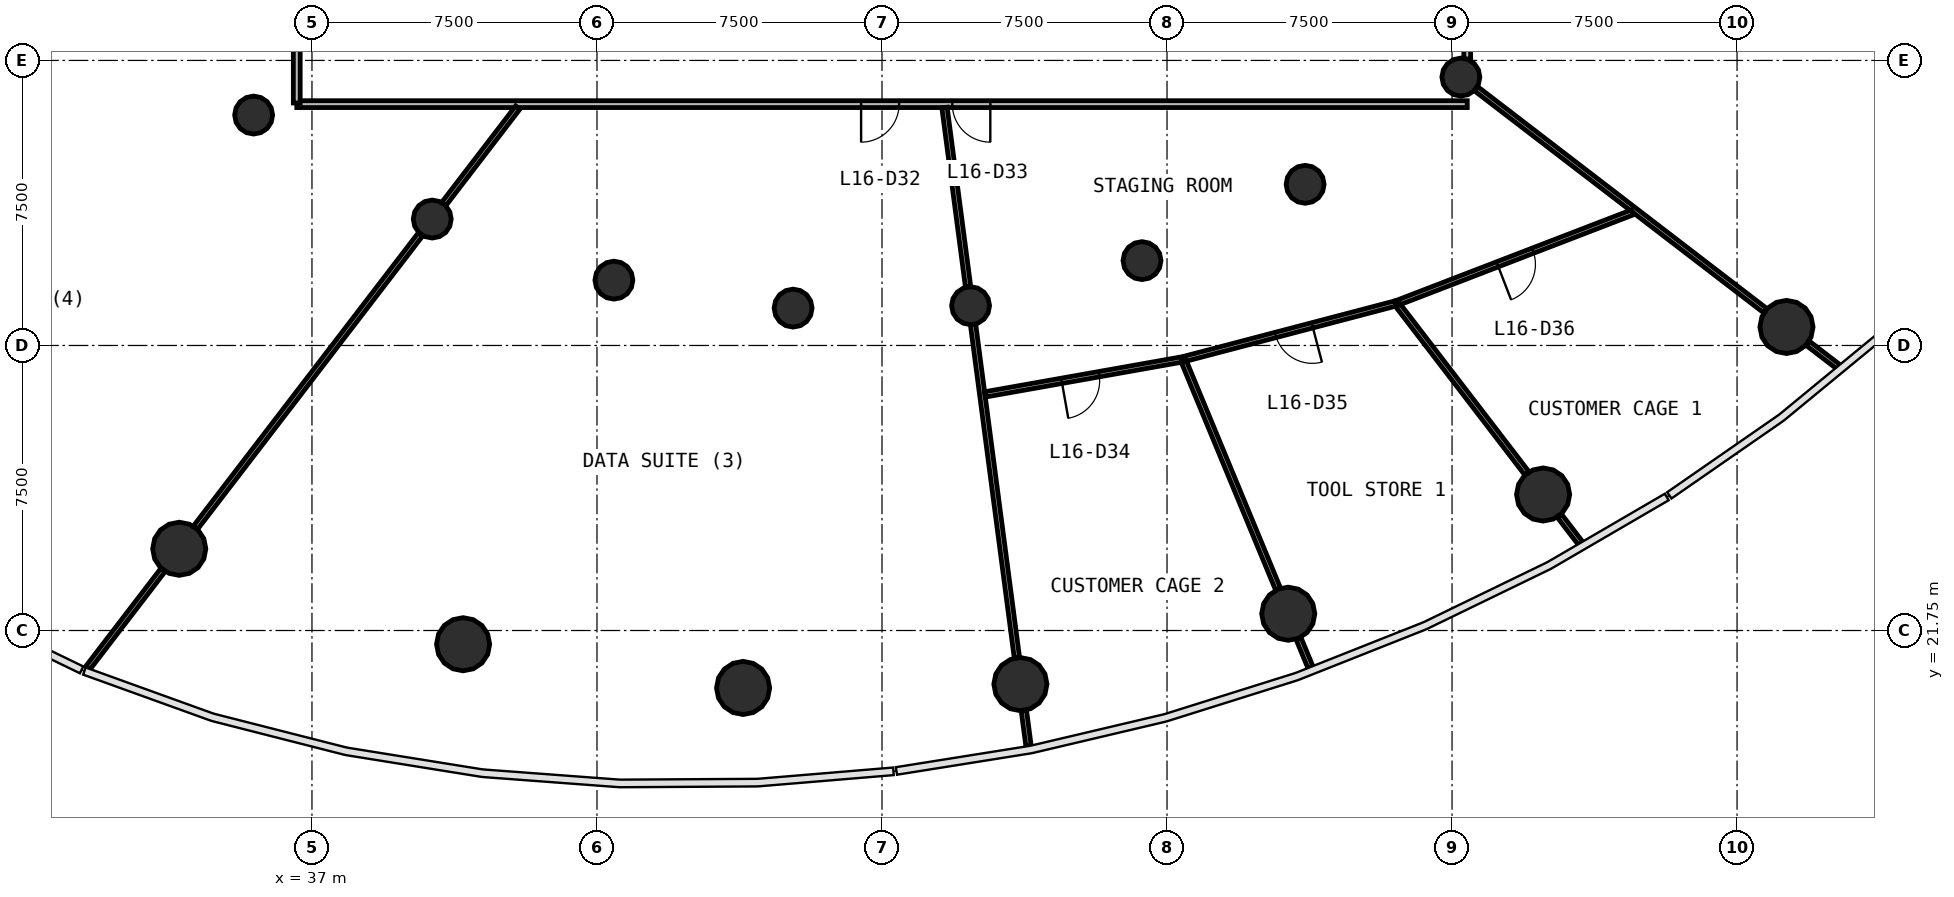
"""IFC4 building model, lengths in metres.
Left out: names, types, materials, properties, quantities, classifications, styles, units other than length and angle.
Written with IfcOpenShell. Run it as: python <this file> out.ifc"""

import sys

from ifc_helpers import new_model, si_unit, direction, frame, frame_2d, origin, origin_2d, place, context, subcontext, project, spatial, rectangle, circle, extrude, source, transform, mapped, element, fill, save


model = new_model("IFC4")
c1 = context("Model", 3, precision=1e-05, world=origin(), true_north=direction((0.0, 1.0)))
c2 = subcontext(c1, "Body", "Model", "MODEL_VIEW")
j1 = project(units=[si_unit("LENGTHUNIT", "METRE"), si_unit("PLANEANGLEUNIT", "RADIAN")], contexts=[c1])
p1 = place(None, origin())
s1 = spatial("IfcSite", under=j1, at=p1, CompositionType="ELEMENT")
p2 = place(p1, origin())
s2 = spatial("IfcBuilding", under=s1, at=p2, CompositionType="ELEMENT")
p3 = place(p2, frame((0.0, 0.0, 71.0)))
s3 = spatial("IfcBuildingStorey", under=s2, at=p3, CompositionType="ELEMENT", Elevation=71.0)
m1 = source(origin(), c2, "Body", "SweptSolid", [
    extrude(circle(Radius=0.7, at=origin_2d()), origin(), (0.0, 0.0, 1.0), 4.4),
])
for number, where, z_axis, x_axis in (
    (1, (33.508, 23.9, 0.0), (0.0, 0.0, 1.0), (1.0, 0.0, 0.0)),
    (2, (40.977, 21.389, 0.0), (0.0, 0.0, 1.0), (1.0, 0.0, 0.0)),
    (3, (48.345, 20.239, 0.0), (0.0, 0.0, 1.0), (1.0, 0.0, 0.0)),
    (4, (55.642, 20.339, 0.0), (0.0, 0.0, 1.0), (1.0, 0.0, 0.0)),
    (5, (62.69, 22.191, 0.0), (0.0, 0.0, 1.0), (1.0, 0.0, 0.0)),
    (6, (69.396, 25.328, 0.0), (0.0, 0.0, 1.0), (1.0, 0.0, 0.0)),
    (7, (75.801, 29.737, 0.0), (0.0, 0.0, 1.0), (1.0, 0.0, 0.0)),
):
    element("IfcColumn", number, at=place(p3, frame(where, z_axis=z_axis, x_axis=x_axis)), inside=s3, PredefinedType="COLUMN", context=c2, shape_type="MappedRepresentation", body=[
        mapped(m1, transform((0.0, 0.0, 0.0), scale=1.0)),
    ])
m2 = source(origin(), c2, "Body", "SweptSolid", [
    extrude(circle(Radius=0.5, at=origin_2d()), origin(), (0.0, 0.0, 1.0), 4.4),
])
for number, where, z_axis, x_axis in (
    (8, (35.465, 35.312, 0.0), (0.0, 0.0, 1.0), (1.0, 0.0, 0.0)),
    (9, (40.165, 32.576, 0.0), (0.0, 0.0, 1.0), (1.0, 0.0, 0.0)),
    (10, (44.945, 30.969, 0.0), (0.0, 0.0, 1.0), (1.0, 0.0, 0.0)),
    (11, (49.661, 30.233, 0.0), (0.0, 0.0, 1.0), (1.0, 0.0, 0.0)),
    (12, (54.331, 30.297, 0.0), (0.0, 0.0, 1.0), (1.0, 0.0, 0.0)),
    (13, (58.842, 31.482, 0.0), (0.0, 0.0, 1.0), (1.0, 0.0, 0.0)),
    (14, (63.134, 33.49, 0.0), (0.0, 0.0, 1.0), (1.0, 0.0, 0.0)),
    (15, (67.232, 36.312, 0.0), (0.0, 0.0, 1.0), (1.0, 0.0, 0.0)),
):
    element("IfcColumn", number, at=place(p3, frame(where, z_axis=z_axis, x_axis=x_axis)), inside=s3, PredefinedType="COLUMN", context=c2, shape_type="MappedRepresentation", body=[
        mapped(m2, transform((0.0, 0.0, 0.0), scale=1.0)),
    ])
p4 = place(p3, frame((67.4, 35.6, 0.0), z_axis=(0.0, 0.0, 1.0), x_axis=(-1.0, 0.0, 0.0)))
e16 = element("IfcWall", 16, at=p4, inside=s3, PredefinedType="PARTITIONING", context=c2, shape_type="SweptSolid", body=[
    extrude(rectangle(XDim=30.8, YDim=0.18, at=frame_2d((15.4, 0.0))), origin(), (0.0, 0.0, 1.0), 3.0),
])
p5 = place(p4, frame((14.95, 0.0, 0.0)))
e17 = element("IfcOpeningElement", 17, at=p5, cuts=e16, PredefinedType="OPENING", context=c2, shape_type="SweptSolid", body=[
    extrude(rectangle(XDim=1.0, YDim=2.1, at=frame_2d((0.5, 1.05))), frame((0.0, 0.1, 0.0), z_axis=(0.0, -1.0, 0.0), x_axis=(1.0, 0.0, 0.0)), (0.0, 0.0, 1.0), 0.2),
])
p6 = place(p4, frame((12.55, 0.0, 0.0)))
e18 = element("IfcOpeningElement", 18, at=p6, cuts=e16, PredefinedType="OPENING", context=c2, shape_type="SweptSolid", body=[
    extrude(rectangle(XDim=1.0, YDim=2.1, at=frame_2d((0.5, 1.05))), frame((0.0, 0.1, 0.0), z_axis=(0.0, -1.0, 0.0), x_axis=(1.0, 0.0, 0.0)), (0.0, 0.0, 1.0), 0.2),
])
p7 = place(p3, frame((67.4, 60.37, 0.0), z_axis=(0.0, 0.0, 1.0), x_axis=(0.0, -1.0, 0.0)))
e19 = element("IfcWall", 19, at=p7, inside=s3, PredefinedType="PARTITIONING", context=c2, shape_type="SweptSolid", body=[
    extrude(rectangle(XDim=23.583, YDim=0.18, at=frame_2d((11.791, 0.0))), origin(), (0.0, 0.0, 1.0), 3.0),
])
p8 = place(p7, frame((14.732, 0.0, 0.0)))
e20 = element("IfcOpeningElement", 20, at=p8, cuts=e19, PredefinedType="OPENING", context=c2, shape_type="SweptSolid", body=[
    extrude(rectangle(XDim=1.0, YDim=2.1, at=frame_2d((0.5, 1.05))), frame((0.0, 0.1, 0.0), z_axis=(0.0, -1.0, 0.0), x_axis=(1.0, 0.0, 0.0)), (0.0, 0.0, 1.0), 0.2),
])
p9 = place(p7, frame((11.333, 0.0, 0.0)))
e21 = element("IfcOpeningElement", 21, at=p9, cuts=e19, PredefinedType="OPENING", context=c2, shape_type="SweptSolid", body=[
    extrude(rectangle(XDim=1.0, YDim=2.1, at=frame_2d((0.5, 1.05))), frame((0.0, 0.1, 0.0), z_axis=(0.0, -1.0, 0.0), x_axis=(1.0, 0.0, 0.0)), (0.0, 0.0, 1.0), 0.2),
])
p10 = place(p3, frame((36.6, 35.63, 0.0), z_axis=(0.0, 0.0, 1.0), x_axis=(0.0, 1.0, 0.0)))
e22 = element("IfcWall", 22, at=p10, inside=s3, PredefinedType="PARTITIONING", context=c2, shape_type="SweptSolid", body=[
    extrude(rectangle(XDim=23.583, YDim=0.18, at=frame_2d((11.791, 0.0))), origin(), (0.0, 0.0, 1.0), 3.0),
])
p11 = place(p10, frame((19.133, 0.0, 0.0)))
e23 = element("IfcOpeningElement", 23, at=p11, cuts=e22, PredefinedType="OPENING", context=c2, shape_type="SweptSolid", body=[
    extrude(rectangle(XDim=1.0, YDim=2.1, at=frame_2d((0.5, 1.05))), frame((0.0, 0.1, 0.0), z_axis=(0.0, -1.0, 0.0), x_axis=(1.0, 0.0, 0.0)), (0.0, 0.0, 1.0), 0.2),
])
p12 = place(p10, frame((14.732, 0.0, 0.0)))
e24 = element("IfcOpeningElement", 24, at=p12, cuts=e22, PredefinedType="OPENING", context=c2, shape_type="SweptSolid", body=[
    extrude(rectangle(XDim=1.0, YDim=2.1, at=frame_2d((0.5, 1.05))), frame((0.0, 0.1, 0.0), z_axis=(0.0, -1.0, 0.0), x_axis=(1.0, 0.0, 0.0)), (0.0, 0.0, 1.0), 0.2),
])
p13 = place(p10, frame((11.333, 0.0, 0.0)))
e25 = element("IfcOpeningElement", 25, at=p13, cuts=e22, PredefinedType="OPENING", context=c2, shape_type="SweptSolid", body=[
    extrude(rectangle(XDim=1.0, YDim=2.1, at=frame_2d((0.5, 1.05))), frame((0.0, 0.1, 0.0), z_axis=(0.0, -1.0, 0.0), x_axis=(1.0, 0.0, 0.0)), (0.0, 0.0, 1.0), 0.2),
])
p14 = place(p10, frame((4.532, 0.0, 0.0)))
e26 = element("IfcOpeningElement", 26, at=p14, cuts=e22, PredefinedType="OPENING", context=c2, shape_type="SweptSolid", body=[
    extrude(rectangle(XDim=1.0, YDim=2.1, at=frame_2d((0.5, 1.05))), frame((0.0, 0.1, 0.0), z_axis=(0.0, -1.0, 0.0), x_axis=(1.0, 0.0, 0.0)), (0.0, 0.0, 1.0), 0.2),
])
p15 = place(p3, frame((30.894, 39.258, 0.0), z_axis=(0.0, 0.0, 1.0), x_axis=(-0.923875075531, -0.382694192291, 0.0)))
e27 = element("IfcWall", 27, at=p15, inside=s3, PredefinedType="PARTITIONING", context=c2, shape_type="SweptSolid", body=[
    extrude(rectangle(XDim=11.356, YDim=0.14, at=frame_2d((5.678, 0.0))), origin(), (0.0, 0.0, 1.0), 3.0),
])
p16 = place(p3, frame((39.858, 32.176, 0.0), z_axis=(0.0, 0.0, 1.0), x_axis=(-0.608770295053, -0.793346537057, 0.0)))
e28 = element("IfcWall", 28, at=p16, inside=s3, PredefinedType="PARTITIONING", context=c2, shape_type="SweptSolid", body=[
    extrude(rectangle(XDim=9.727, YDim=0.14, at=frame_2d((4.864, 0.0))), origin(), (0.0, 0.0, 1.0), 3.0),
])
p17 = place(p3, frame((67.633, 36.005, 0.0), z_axis=(0.0, 0.0, 1.0), x_axis=(0.793366218398, -0.608744645566, 0.0)))
e29 = element("IfcWall", 29, at=p17, inside=s3, PredefinedType="PARTITIONING", context=c2, shape_type="SweptSolid", body=[
    extrude(rectangle(XDim=9.591, YDim=0.14, at=frame_2d((4.796, 0.0))), origin(), (0.0, 0.0, 1.0), 3.0),
])
p18 = place(p3, frame((55.55, 21.037, 0.0), z_axis=(0.0, 0.0, 1.0), x_axis=(-0.130534568438, 0.991443758588, 0.0)))
e30 = element("IfcWall", 30, at=p18, inside=s3, PredefinedType="PARTITIONING", context=c2, shape_type="SweptSolid", body=[
    extrude(rectangle(XDim=8.835, YDim=0.14, at=frame_2d((4.418, 0.0))), origin(), (0.0, 0.0, 1.0), 3.0),
])
p19 = place(p3, frame((71.753, 32.755, 0.0), z_axis=(0.0, 0.0, 1.0), x_axis=(-0.933202930279, -0.359349816917, 0.0)))
e31 = element("IfcWall", 31, at=p19, inside=s3, PredefinedType="PARTITIONING", context=c2, shape_type="SweptSolid", body=[
    extrude(rectangle(XDim=6.663, YDim=0.14, at=frame_2d((3.332, 0.0))), origin(), (0.0, 0.0, 1.0), 3.0),
])
p20 = place(p19, frame((2.812, 0.0, 0.0)))
e32 = element("IfcOpeningElement", 32, at=p20, cuts=e31, PredefinedType="OPENING", context=c2, shape_type="SweptSolid", body=[
    extrude(rectangle(XDim=1.0, YDim=2.1, at=frame_2d((0.5, 1.05))), frame((0.0, 0.08, 0.0), z_axis=(0.0, -1.0, 0.0), x_axis=(1.0, 0.0, 0.0)), (0.0, 0.0, 1.0), 0.16),
])
p21 = place(p3, frame((59.917, 28.886, 0.0), z_axis=(0.0, 0.0, 1.0), x_axis=(0.382663867465, -0.923887636315, 0.0)))
e33 = element("IfcWall", 33, at=p21, inside=s3, PredefinedType="PARTITIONING", context=c2, shape_type="SweptSolid", body=[
    extrude(rectangle(XDim=6.541, YDim=0.14, at=frame_2d((3.271, 0.0))), origin(), (0.0, 0.0, 1.0), 3.0),
])
p22 = place(p3, frame((65.506, 30.353, 0.0), z_axis=(0.0, 0.0, 1.0), x_axis=(-0.967206275549, -0.253992166293, 0.0)))
e34 = element("IfcWall", 34, at=p22, inside=s3, PredefinedType="PARTITIONING", context=c2, shape_type="SweptSolid", body=[
    extrude(rectangle(XDim=5.708, YDim=0.14, at=frame_2d((2.854, 0.0))), origin(), (0.0, 0.0, 1.0), 3.0),
])
p23 = place(p22, frame((2.257, 0.0, 0.0)))
e35 = element("IfcOpeningElement", 35, at=p23, cuts=e34, PredefinedType="OPENING", context=c2, shape_type="SweptSolid", body=[
    extrude(rectangle(XDim=1.0, YDim=2.1, at=frame_2d((0.5, 1.05))), frame((0.0, 0.08, 0.0), z_axis=(0.0, -1.0, 0.0), x_axis=(1.0, 0.0, 0.0)), (0.0, 0.0, 1.0), 0.16),
])
p24 = place(p3, frame((65.579, 30.303, 0.0), z_axis=(0.0, 0.0, 1.0), x_axis=(0.608777700967, -0.793340854113, 0.0)))
e36 = element("IfcWall", 36, at=p24, inside=s3, PredefinedType="PARTITIONING", context=c2, shape_type="SweptSolid", body=[
    extrude(rectangle(XDim=5.566, YDim=0.14, at=frame_2d((2.783, 0.0))), origin(), (0.0, 0.0, 1.0), 3.0),
])
p25 = place(p3, frame((59.888, 28.881, 0.0), z_axis=(0.0, 0.0, 1.0), x_axis=(-0.984613478477, -0.17474638194, 0.0)))
e37 = element("IfcWall", 37, at=p25, inside=s3, PredefinedType="PARTITIONING", context=c2, shape_type="SweptSolid", body=[
    extrude(rectangle(XDim=5.26, YDim=0.14, at=frame_2d((2.63, 0.0))), origin(), (0.0, 0.0, 1.0), 3.0),
])
p26 = place(p25, frame((2.21, 0.0, 0.0)))
e38 = element("IfcOpeningElement", 38, at=p26, cuts=e37, PredefinedType="OPENING", context=c2, shape_type="SweptSolid", body=[
    extrude(rectangle(XDim=1.0, YDim=2.1, at=frame_2d((0.5, 1.05))), frame((0.0, 0.08, 0.0), z_axis=(0.0, -1.0, 0.0), x_axis=(1.0, 0.0, 0.0)), (0.0, 0.0, 1.0), 0.16),
])
p27 = place(p3, frame((53.644, 35.51, 0.0), z_axis=(0.0, 0.0, 1.0), x_axis=(0.130548834981, -0.991441880135, 0.0)))
e39 = element("IfcWall", 39, at=p27, inside=s3, PredefinedType="PARTITIONING", context=c2, shape_type="SweptSolid", body=[
    extrude(rectangle(XDim=4.754, YDim=0.14, at=frame_2d((2.377, 0.0))), origin(), (0.0, 0.0, 1.0), 3.0),
])
p28 = place(p3, frame((42.416, 35.51, 0.0), z_axis=(0.0, 0.0, 1.0), x_axis=(-0.60874605662, -0.793365135703, 0.0)))
e40 = element("IfcWall", 40, at=p28, inside=s3, PredefinedType="PARTITIONING", context=c2, shape_type="SweptSolid", body=[
    extrude(rectangle(XDim=3.194, YDim=0.14, at=frame_2d((1.597, 0.0))), origin(), (0.0, 0.0, 1.0), 3.0),
])
p29 = place(p3, frame((33.079, 23.342, 0.0), z_axis=(0.0, 0.0, 1.0), x_axis=(-0.608787991926, -0.793332957141, 0.0)))
e41 = element("IfcWall", 41, at=p29, inside=s3, PredefinedType="PARTITIONING", context=c2, shape_type="SweptSolid", body=[
    extrude(rectangle(XDim=3.249, YDim=0.14, at=frame_2d((1.625, 0.0))), origin(), (0.0, 0.0, 1.0), 3.0),
])
p30 = place(p3, frame((77.173, 28.684, 0.0), z_axis=(0.0, 0.0, 1.0), x_axis=(-0.793207707095, 0.608951174895, 0.0)))
e42 = element("IfcWall", 42, at=p30, inside=s3, PredefinedType="PARTITIONING", context=c2, shape_type="SweptSolid", body=[
    extrude(rectangle(XDim=1.026, YDim=0.14, at=frame_2d((0.513, 0.0))), origin(), (0.0, 0.0, 1.0), 3.0),
])
p31 = place(p3, frame((55.734, 19.64, 0.0), z_axis=(0.0, 0.0, 1.0), x_axis=(0.130495264695, -0.991448932569, 0.0)))
e43 = element("IfcWall", 43, at=p31, inside=s3, PredefinedType="PARTITIONING", context=c2, shape_type="SweptSolid", body=[
    extrude(rectangle(XDim=0.93, YDim=0.14, at=frame_2d((0.465, 0.0))), origin(), (0.0, 0.0, 1.0), 3.0),
])
p32 = place(p3, frame((69.825, 24.77, 0.0), z_axis=(0.0, 0.0, 1.0), x_axis=(0.609005189918, -0.793166236455, 0.0)))
e44 = element("IfcWall", 44, at=p32, inside=s3, PredefinedType="PARTITIONING", context=c2, shape_type="SweptSolid", body=[
    extrude(rectangle(XDim=0.92, YDim=0.14, at=frame_2d((0.46, 0.0))), origin(), (0.0, 0.0, 1.0), 3.0),
])
p33 = place(p3, frame((62.96, 21.54, 0.0), z_axis=(0.0, 0.0, 1.0), x_axis=(0.382641988431, -0.923896698062, 0.0)))
e45 = element("IfcWall", 45, at=p33, inside=s3, PredefinedType="PARTITIONING", context=c2, shape_type="SweptSolid", body=[
    extrude(rectangle(XDim=0.817, YDim=0.14, at=frame_2d((0.409, 0.0))), origin(), (0.0, 0.0, 1.0), 3.0),
])
m3 = source(origin(), c2, "Body", "SweptSolid", [
    extrude(rectangle(XDim=1.0, YDim=2.1, at=frame_2d((0.5, 1.05))), frame((0.0, 0.025, 0.0), z_axis=(0.0, -1.0, 0.0), x_axis=(1.0, 0.0, 0.0)), (0.0, 0.0, 1.0), 0.05),
])
p34 = place(p5, origin())
e46 = element("IfcDoor", 46, at=p34, inside=s3, OperationType="SINGLE_SWING_RIGHT", PredefinedType="DOOR", context=c2, shape_type="MappedRepresentation", body=[
    mapped(m3, transform((0.0, 0.0, 0.0), scale=1.0)),
])
fill(e17, e46)
p35 = place(p6, origin())
e47 = element("IfcDoor", 47, at=p35, inside=s3, OperationType="SINGLE_SWING_LEFT", PredefinedType="DOOR", context=c2, shape_type="MappedRepresentation", body=[
    mapped(m3, transform((0.0, 0.0, 0.0), scale=1.0)),
])
fill(e18, e47)
p36 = place(p26, origin())
e48 = element("IfcDoor", 48, at=p36, inside=s3, OperationType="SINGLE_SWING_RIGHT", PredefinedType="DOOR", context=c2, shape_type="MappedRepresentation", body=[
    mapped(m3, transform((0.0, 0.0, 0.0), scale=1.0)),
])
fill(e38, e48)
p37 = place(p23, origin())
e49 = element("IfcDoor", 49, at=p37, inside=s3, OperationType="SINGLE_SWING_LEFT", PredefinedType="DOOR", context=c2, shape_type="MappedRepresentation", body=[
    mapped(m3, transform((0.0, 0.0, 0.0), scale=1.0)),
])
fill(e35, e49)
p38 = place(p20, origin())
e50 = element("IfcDoor", 50, at=p38, inside=s3, OperationType="SINGLE_SWING_RIGHT", PredefinedType="DOOR", context=c2, shape_type="MappedRepresentation", body=[
    mapped(m3, transform((0.0, 0.0, 0.0), scale=1.0)),
])
fill(e32, e50)
save(model, sys.argv[1])
